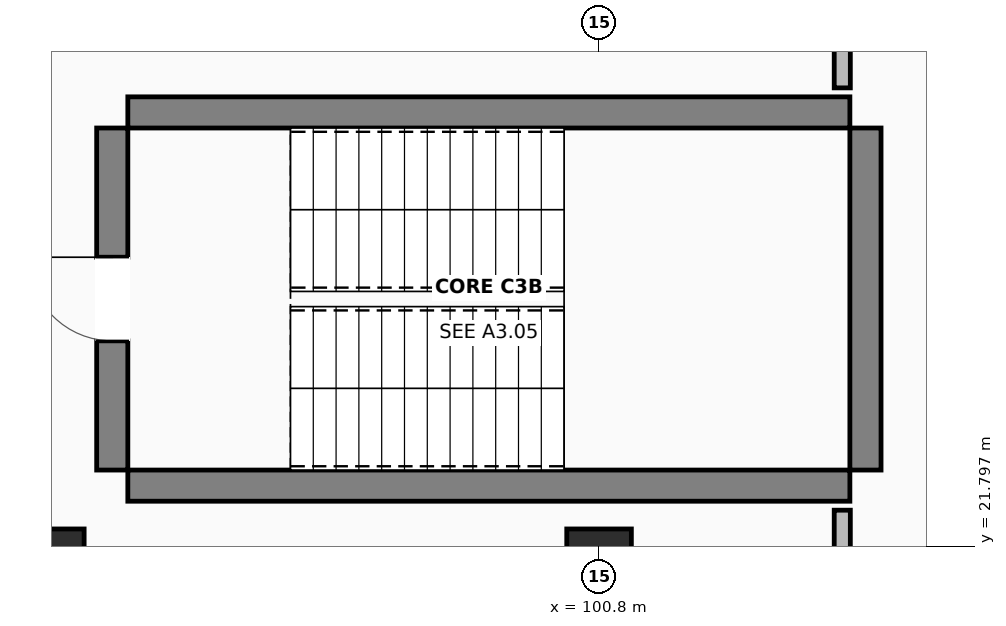
"""IFC4 building model, lengths in metres.
Left out: names, types, materials, properties, quantities, classifications, styles, units other than length and angle.
Written with IfcOpenShell. Run it as: python <this file> out.ifc"""

import sys

from ifc_helpers import new_model, si_unit, direction, frame, frame_2d, origin, origin_2d, place, context, subcontext, project, spatial, rectangle, extrude, element, fill, save


model = new_model("IFC4")
c1 = context("Model", 3, precision=1e-05, world=origin(), true_north=direction((0.0, 1.0)))
c2 = subcontext(c1, "Body", "Model", "MODEL_VIEW")
j1 = project(units=[si_unit("LENGTHUNIT", "METRE"), si_unit("PLANEANGLEUNIT", "RADIAN")], contexts=[c1])
p1 = place(None, origin())
s1 = spatial("IfcSite", under=j1, at=p1, CompositionType="ELEMENT")
p2 = place(p1, origin())
s2 = spatial("IfcBuilding", under=s1, at=p2, CompositionType="ELEMENT")
p3 = place(p2, frame((0.0, 0.0, 9.0)))
s3 = spatial("IfcBuildingStorey", under=s2, at=p3, CompositionType="ELEMENT", Elevation=9.0)
for number, where, z_axis, x_axis in (
    (1, (93.6, 21.6, 0.0), (0.0, 0.0, 1.0), (1.0, 0.0, 0.0)),
    (2, (100.8, 21.6, 0.0), (0.0, 0.0, 1.0), (1.0, 0.0, 0.0)),
):
    element("IfcColumn", number, at=place(p3, frame(where, z_axis=z_axis, x_axis=x_axis)), inside=s3, PredefinedType="COLUMN", context=c2, shape_type="SweptSolid", body=[
        extrude(rectangle(XDim=0.85, YDim=0.85, at=origin_2d()), origin(), (0.0, 0.0, 1.0), 4.22),
    ])
for number, where, z_axis, x_axis in (
    (3, (94.6, 22.595, 0.0), (0.0, 0.0, 1.0), (1.0, 0.0, 0.0)),
    (4, (94.6, 27.505, 0.0), (0.0, 0.0, 1.0), (1.0, 0.0, 0.0)),
):
    element("IfcWall", number, at=place(p3, frame(where, z_axis=z_axis, x_axis=x_axis)), inside=s3, PredefinedType="SHEAR", context=c2, shape_type="SweptSolid", body=[
        extrude(rectangle(XDim=9.5, YDim=0.41, at=frame_2d((4.75, 0.0))), origin(), (0.0, 0.0, 1.0), 4.22),
    ])
p4 = place(p3, frame((94.395, 22.8, 0.0), z_axis=(0.0, 0.0, 1.0), x_axis=(0.0, 1.0, 0.0)))
e5 = element("IfcWall", 5, at=p4, inside=s3, PredefinedType="SHEAR", context=c2, shape_type="SweptSolid", body=[
    extrude(rectangle(XDim=4.5, YDim=0.41, at=frame_2d((2.25, 0.0))), origin(), (0.0, 0.0, 1.0), 4.22),
])
p5 = place(p4, frame((1.7, 0.0, 0.0)))
e6 = element("IfcOpeningElement", 6, at=p5, cuts=e5, PredefinedType="OPENING", context=c2, shape_type="SweptSolid", body=[
    extrude(rectangle(XDim=1.1, YDim=2.15, at=frame_2d((0.55, 1.075))), frame((0.0, 0.215, 0.0), z_axis=(0.0, -1.0, 0.0), x_axis=(1.0, 0.0, 0.0)), (0.0, 0.0, 1.0), 0.43),
])
p6 = place(p3, frame((104.305, 22.8, 0.0), z_axis=(0.0, 0.0, 1.0), x_axis=(0.0, 1.0, 0.0)))
e7 = element("IfcWall", 7, at=p6, inside=s3, PredefinedType="SHEAR", context=c2, shape_type="SweptSolid", body=[
    extrude(rectangle(XDim=4.5, YDim=0.41, at=frame_2d((2.25, 0.0))), origin(), (0.0, 0.0, 1.0), 4.22),
])
p7 = place(p3, frame((104.0, 19.802, 0.0), z_axis=(0.0, 0.0, 1.0), x_axis=(0.0, 1.0, 0.0)))
e8 = element("IfcWall", 8, at=p7, inside=s3, PredefinedType="PARTITIONING", context=c2, shape_type="SweptSolid", body=[
    extrude(rectangle(XDim=2.47, YDim=0.212, at=frame_2d((1.235, 0.0))), origin(), (0.0, 0.0, 1.0), 3.26),
])
p8 = place(p3, frame((104.0, 27.828, 0.0), z_axis=(0.0, 0.0, 1.0), x_axis=(0.0, 1.0, 0.0)))
e9 = element("IfcWall", 9, at=p8, inside=s3, PredefinedType="PARTITIONING", context=c2, shape_type="SweptSolid", body=[
    extrude(rectangle(XDim=2.352, YDim=0.212, at=frame_2d((1.176, 0.0))), origin(), (0.0, 0.0, 1.0), 3.26),
])
p9 = place(p5, origin())
e10 = element("IfcDoor", 10, at=p9, inside=s3, OperationType="SINGLE_SWING_RIGHT", PredefinedType="DOOR", context=c2, shape_type="SweptSolid", body=[
    extrude(rectangle(XDim=1.1, YDim=2.15, at=frame_2d((0.55, 1.075))), frame((0.0, 0.025, 0.0), z_axis=(0.0, -1.0, 0.0), x_axis=(1.0, 0.0, 0.0)), (0.0, 0.0, 1.0), 0.05),
])
fill(e6, e10)
save(model, sys.argv[1])
